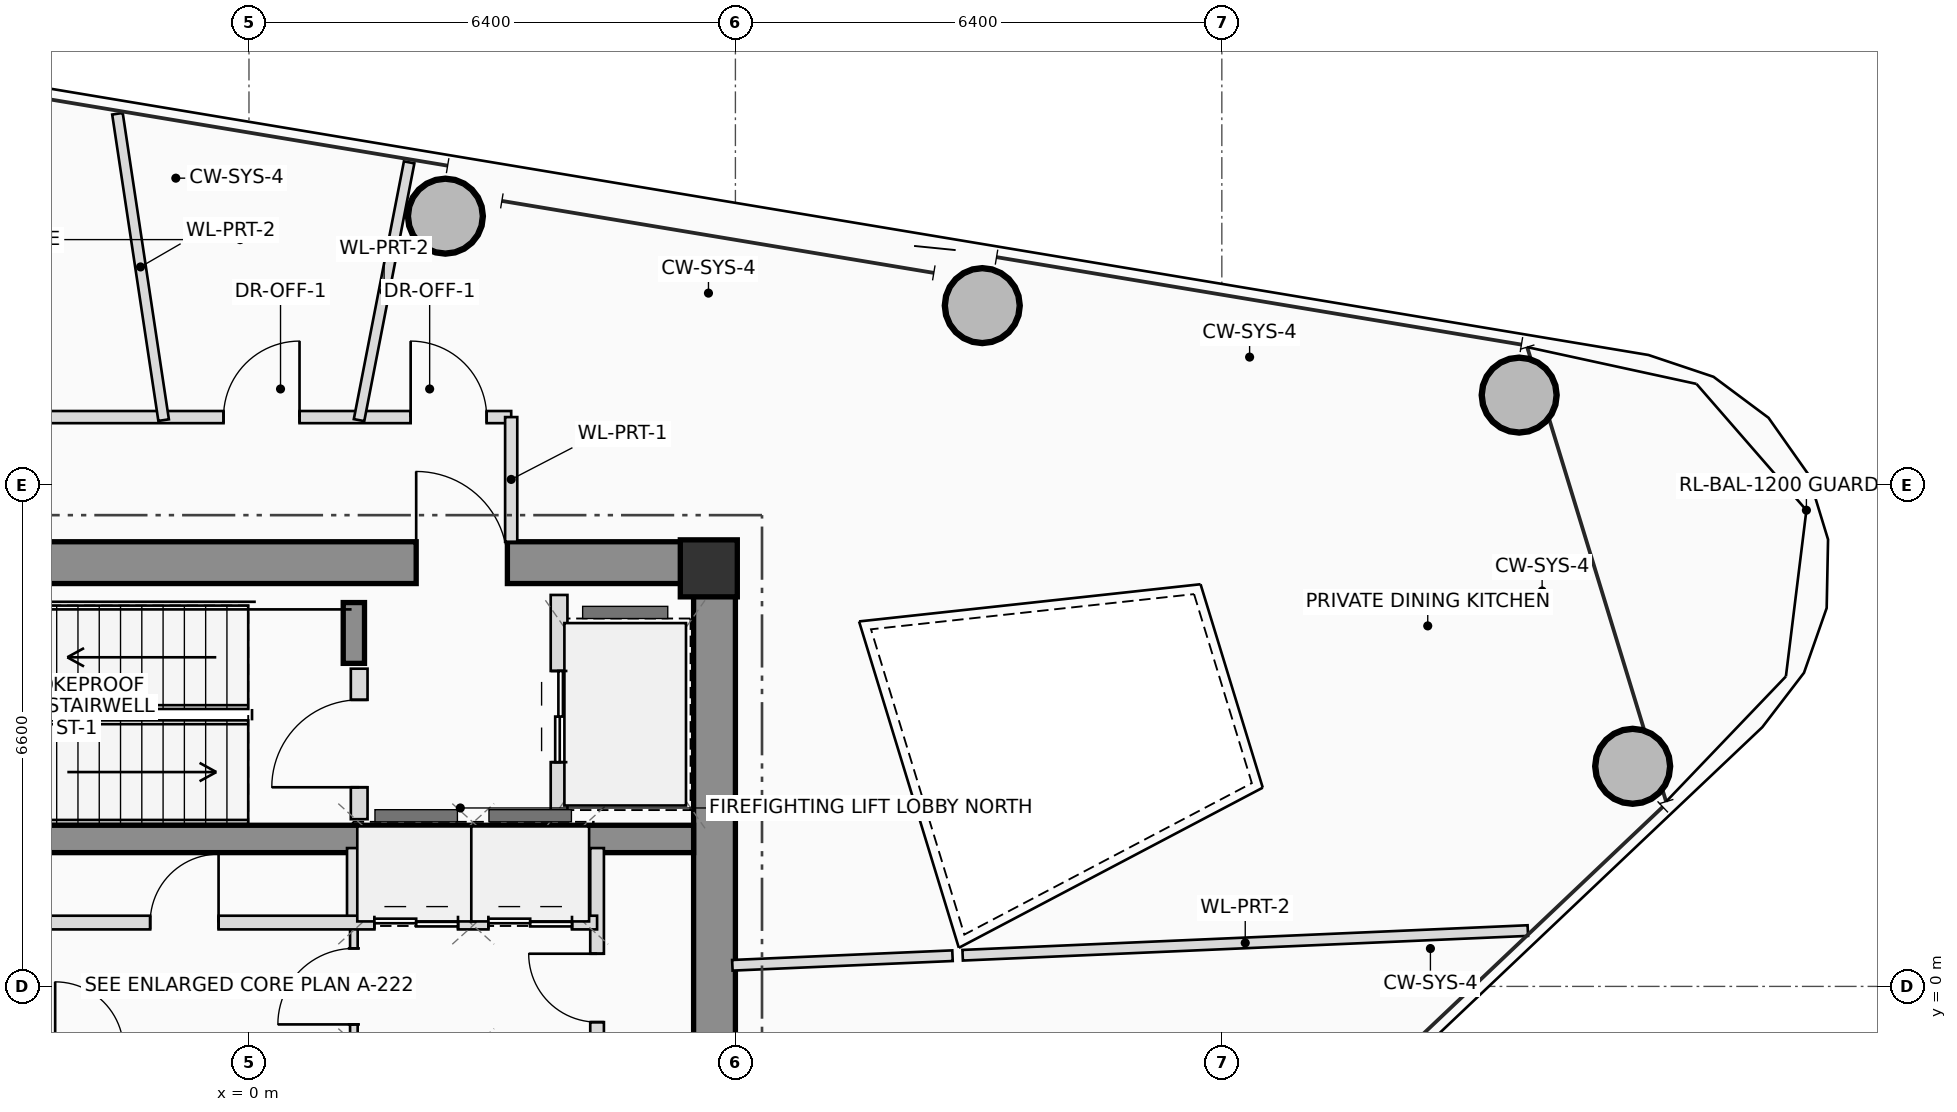
"""IFC4 building model, lengths in metres.
Left out: names, types, materials, properties, quantities, classifications, styles, units other than length and angle.
Written with IfcOpenShell. Run it as: python <this file> out.ifc"""

import sys

from ifc_helpers import new_model, si_unit, direction, frame, frame_2d, origin, origin_2d, place, context, subcontext, project, spatial, rectangle, hollow_circle, extrude, source, transform, mapped, element, fill, save


model = new_model("IFC4")
c1 = context("Model", 3, precision=1e-05, world=origin(), true_north=direction((0.0, 1.0)))
c2 = subcontext(c1, "Body", "Model", "MODEL_VIEW")
j1 = project(units=[si_unit("LENGTHUNIT", "METRE"), si_unit("PLANEANGLEUNIT", "RADIAN")], contexts=[c1])
p1 = place(None, origin())
s1 = spatial("IfcSite", under=j1, at=p1, CompositionType="ELEMENT")
p2 = place(p1, origin())
s2 = spatial("IfcBuilding", under=s1, at=p2, CompositionType="ELEMENT")
p3 = place(p2, frame((0.0, 0.0, 238.85)))
s3 = spatial("IfcBuildingStorey", under=s2, at=p3, CompositionType="ELEMENT", Elevation=238.85)
m1 = source(origin(), c2, "Body", "SweptSolid", [
    extrude(rectangle(XDim=0.75, YDim=0.75, at=origin_2d()), origin(), (0.0, 0.0, 1.0), 3.4),
])
p4 = place(p3, frame((6.05, 5.5, 0.0), z_axis=(0.0, 0.0, 1.0), x_axis=(1.0, 0.0, 0.0)))
e1 = element("IfcColumn", 1, at=p4, inside=s3, PredefinedType="COLUMN", context=c2, shape_type="MappedRepresentation", body=[
    mapped(m1, transform((0.0, 0.0, 0.0), scale=1.0)),
])
p5 = place(p3, frame((-6.4, 5.575, 0.0), z_axis=(0.0, 0.0, 1.0), x_axis=(1.0, 0.0, 0.0)))
e2 = element("IfcWall", 2, at=p5, inside=s3, PredefinedType="SHEAR", context=c2, shape_type="SweptSolid", body=[
    extrude(rectangle(XDim=12.8, YDim=0.55, at=frame_2d((6.4, 0.0))), origin(), (0.0, 0.0, 1.0), 3.4),
])
p6 = place(p5, frame((8.6, 0.0, 0.0)))
e3 = element("IfcOpeningElement", 3, at=p6, cuts=e2, PredefinedType="OPENING", context=c2, shape_type="SweptSolid", body=[
    extrude(rectangle(XDim=1.2, YDim=2.2, at=frame_2d((0.6, 1.1))), frame((0.0, 0.285, 0.0), z_axis=(0.0, -1.0, 0.0), x_axis=(1.0, 0.0, 0.0)), (0.0, 0.0, 1.0), 0.57),
])
p7 = place(p3, frame((6.125, -5.3, 0.0), z_axis=(0.0, 0.0, 1.0), x_axis=(0.0, 1.0, 0.0)))
e4 = element("IfcWall", 4, at=p7, inside=s3, PredefinedType="SHEAR", context=c2, shape_type="SweptSolid", body=[
    extrude(rectangle(XDim=10.6, YDim=0.55, at=frame_2d((5.3, 0.0))), origin(), (0.0, 0.0, 1.0), 3.4),
])
p8 = place(p3, frame((-5.85, 1.94, 0.0), z_axis=(0.0, 0.0, 1.0), x_axis=(1.0, 0.0, 0.0)))
e5 = element("IfcWall", 5, at=p8, inside=s3, PredefinedType="SHEAR", context=c2, shape_type="SweptSolid", body=[
    extrude(rectangle(XDim=11.7, YDim=0.36, at=frame_2d((5.85, 0.0))), origin(), (0.0, 0.0, 1.0), 3.4),
])
p9 = place(p3, frame((1.38, 4.25, 0.0), z_axis=(0.0, 0.0, 1.0), x_axis=(0.0, 1.0, 0.0)))
e6 = element("IfcWall", 6, at=p9, inside=s3, PredefinedType="SHEAR", context=c2, shape_type="SweptSolid", body=[
    extrude(rectangle(XDim=0.8, YDim=0.28, at=frame_2d((0.4, 0.0))), origin(), (0.0, 0.0, 1.0), 3.4),
])
m2 = source(origin(), c2, "Body", "SweptSolid", [
    extrude(hollow_circle(Radius=0.5, WallThickness=0.04, at=origin_2d()), origin(), (0.0, 0.0, 1.0), 3.4),
])
for number, where, z_axis, x_axis in (
    (7, (18.205, 2.896, 0.0), (0.0, 0.0, 1.0), (1.0, 0.0, 0.0)),
    (8, (16.712, 7.779, 0.0), (0.0, 0.0, 1.0), (1.0, 0.0, 0.0)),
    (9, (9.648, 8.957, 0.0), (0.0, 0.0, 1.0), (1.0, 0.0, 0.0)),
    (10, (2.584, 10.134, 0.0), (0.0, 0.0, 1.0), (1.0, 0.0, 0.0)),
):
    element("IfcColumn", number, at=place(p3, frame(where, z_axis=z_axis, x_axis=x_axis)), inside=s3, PredefinedType="COLUMN", context=c2, shape_type="MappedRepresentation", body=[
        mapped(m2, transform((0.0, 0.0, 0.0), scale=1.0)),
    ])
p10 = place(p3, frame((1.45, 2.2, 0.0), z_axis=(0.0, 0.0, 1.0), x_axis=(0.0, 1.0, 0.0)))
e11 = element("IfcWall", 11, at=p10, inside=s3, PredefinedType="PLUMBINGWALL", context=c2, shape_type="SweptSolid", body=[
    extrude(rectangle(XDim=1.98, YDim=0.22, at=frame_2d((0.99, 0.0))), origin(), (0.0, 0.0, 1.0), 3.2),
])
p11 = place(p10, frame((0.42, 0.0, 0.0)))
e12 = element("IfcOpeningElement", 12, at=p11, cuts=e11, PredefinedType="OPENING", context=c2, shape_type="SweptSolid", body=[
    extrude(rectangle(XDim=1.15, YDim=2.15, at=frame_2d((0.575, 1.075))), frame((0.0, 0.12, 0.0), z_axis=(0.0, -1.0, 0.0), x_axis=(1.0, 0.0, 0.0)), (0.0, 0.0, 1.0), 0.24),
])
p12 = place(p3, frame((4.08, 2.2, 0.0), z_axis=(0.0, 0.0, 1.0), x_axis=(0.0, 1.0, 0.0)))
e13 = element("IfcWall", 13, at=p12, inside=s3, PredefinedType="PLUMBINGWALL", context=c2, shape_type="SweptSolid", body=[
    extrude(rectangle(XDim=2.95, YDim=0.22, at=frame_2d((1.475, 0.0))), origin(), (0.0, 0.0, 1.0), 3.2),
])
p13 = place(p12, frame((0.75, 0.0, 0.0)))
e14 = element("IfcOpeningElement", 14, at=p13, cuts=e13, PredefinedType="OPENING", context=c2, shape_type="SweptSolid", body=[
    extrude(rectangle(XDim=1.2, YDim=2.25, at=frame_2d((0.6, 1.125))), frame((0.0, 0.12, 0.0), z_axis=(0.0, -1.0, 0.0), x_axis=(1.0, 0.0, 0.0)), (0.0, 0.0, 1.0), 0.24),
])
p14 = place(p3, frame((1.38, -0.84, 0.0), z_axis=(0.0, 0.0, 1.0), x_axis=(0.0, 1.0, 0.0)))
e15 = element("IfcWall", 15, at=p14, inside=s3, PredefinedType="PARTITIONING", context=c2, shape_type="SweptSolid", body=[
    extrude(rectangle(XDim=1.68, YDim=0.1, at=frame_2d((0.84, 0.0))), origin(), (0.0, 0.0, 1.0), 3.2),
])
p15 = place(p14, frame((0.34, 0.0, 0.0)))
e16 = element("IfcOpeningElement", 16, at=p15, cuts=e15, PredefinedType="OPENING", context=c2, shape_type="SweptSolid", body=[
    extrude(rectangle(XDim=1.0, YDim=2.25, at=frame_2d((0.5, 1.125))), frame((0.0, 0.06, 0.0), z_axis=(0.0, -1.0, 0.0), x_axis=(1.0, 0.0, 0.0)), (0.0, 0.0, 1.0), 0.12),
])
for number, where, z_axis, x_axis in (
    (17, (1.38, 0.84, 0.0), (0.0, 0.0, 1.0), (0.0, 1.0, 0.0)),
    (18, (3.02, 0.84, 0.0), (0.0, 0.0, 1.0), (0.0, 1.0, 0.0)),
    (19, (4.38, 0.84, 0.0), (0.0, 0.0, 1.0), (0.0, 1.0, 0.0)),
):
    element("IfcWall", number, at=place(p3, frame(where, z_axis=z_axis, x_axis=x_axis)), inside=s3, PredefinedType="PLUMBINGWALL", context=c2, shape_type="SweptSolid", body=[
        extrude(rectangle(XDim=0.98, YDim=0.18, at=frame_2d((0.49, 0.0))), origin(), (0.0, 0.0, 1.0), 3.2),
    ])
p16 = place(p3, frame((4.58, -1.82, 0.0), z_axis=(0.0, 0.0, 1.0), x_axis=(0.0, 1.0, 0.0)))
e20 = element("IfcWall", 20, at=p16, inside=s3, PredefinedType="PLUMBINGWALL", context=c2, shape_type="SweptSolid", body=[
    extrude(rectangle(XDim=3.64, YDim=0.18, at=frame_2d((1.82, 0.0))), origin(), (0.0, 0.0, 1.0), 3.2),
])
p17 = place(p16, frame((1.35, 0.0, 0.0)))
e21 = element("IfcOpeningElement", 21, at=p17, cuts=e20, PredefinedType="OPENING", context=c2, shape_type="SweptSolid", body=[
    extrude(rectangle(XDim=0.9, YDim=2.05, at=frame_2d((0.45, 1.025))), frame((0.0, 0.1, 0.0), z_axis=(0.0, -1.0, 0.0), x_axis=(1.0, 0.0, 0.0)), (0.0, 0.0, 1.0), 0.2),
])
p18 = place(p3, frame((-5.68, 0.84, 0.0), z_axis=(0.0, 0.0, 1.0), x_axis=(1.0, 0.0, 0.0)))
e22 = element("IfcWall", 22, at=p18, inside=s3, PredefinedType="PLUMBINGWALL", context=c2, shape_type="SweptSolid", body=[
    extrude(rectangle(XDim=10.26, YDim=0.18, at=frame_2d((5.13, 0.0))), origin(), (0.0, 0.0, 1.0), 3.2),
])
p19 = place(p18, frame((0.91, 0.0, 0.0)))
e23 = element("IfcOpeningElement", 23, at=p19, cuts=e22, PredefinedType="OPENING", context=c2, shape_type="SweptSolid", body=[
    extrude(rectangle(XDim=0.9, YDim=2.05, at=frame_2d((0.45, 1.025))), frame((0.0, 0.1, 0.0), z_axis=(0.0, -1.0, 0.0), x_axis=(1.0, 0.0, 0.0)), (0.0, 0.0, 1.0), 0.2),
])
p20 = place(p18, frame((4.38, 0.0, 0.0)))
e24 = element("IfcOpeningElement", 24, at=p20, cuts=e22, PredefinedType="OPENING", context=c2, shape_type="SweptSolid", body=[
    extrude(rectangle(XDim=0.9, YDim=2.05, at=frame_2d((0.45, 1.025))), frame((0.0, 0.1, 0.0), z_axis=(0.0, -1.0, 0.0), x_axis=(1.0, 0.0, 0.0)), (0.0, 0.0, 1.0), 0.2),
])
p21 = place(p18, frame((7.33, 0.0, 0.0)))
e25 = element("IfcOpeningElement", 25, at=p21, cuts=e22, PredefinedType="OPENING", context=c2, shape_type="SweptSolid", body=[
    extrude(rectangle(XDim=1.1, YDim=2.2, at=frame_2d((0.55, 1.1))), frame((0.0, 0.1, 0.0), z_axis=(0.0, -1.0, 0.0), x_axis=(1.0, 0.0, 0.0)), (0.0, 0.0, 1.0), 0.2),
])
p22 = place(p18, frame((8.83, 0.0, 0.0)))
e26 = element("IfcOpeningElement", 26, at=p22, cuts=e22, PredefinedType="OPENING", context=c2, shape_type="SweptSolid", body=[
    extrude(rectangle(XDim=1.1, YDim=2.2, at=frame_2d((0.55, 1.1))), frame((0.0, 0.1, 0.0), z_axis=(0.0, -1.0, 0.0), x_axis=(1.0, 0.0, 0.0)), (0.0, 0.0, 1.0), 0.2),
])
p23 = place(p3, frame((-6.36, 7.49, 0.0), z_axis=(0.0, 0.0, 1.0), x_axis=(1.0, 0.0, 0.0)))
e27 = element("IfcWall", 27, at=p23, inside=s3, PredefinedType="PARTITIONING", context=c2, shape_type="SweptSolid", body=[
    extrude(rectangle(XDim=9.81, YDim=0.16, at=frame_2d((4.905, 0.0))), origin(), (0.0, 0.0, 1.0), 2.605),
])
p24 = place(p23, frame((6.025, 0.0, 0.0)))
e28 = element("IfcOpeningElement", 28, at=p24, cuts=e27, PredefinedType="OPENING", context=c2, shape_type="SweptSolid", body=[
    extrude(rectangle(XDim=1.0, YDim=2.25, at=frame_2d((0.5, 1.125))), frame((0.0, 0.09, 0.0), z_axis=(0.0, -1.0, 0.0), x_axis=(1.0, 0.0, 0.0)), (0.0, 0.0, 1.0), 0.18),
])
p25 = place(p23, frame((8.487, 0.0, 0.0)))
e29 = element("IfcOpeningElement", 29, at=p25, cuts=e27, PredefinedType="OPENING", context=c2, shape_type="SweptSolid", body=[
    extrude(rectangle(XDim=1.0, YDim=2.25, at=frame_2d((0.5, 1.125))), frame((0.0, 0.09, 0.0), z_axis=(0.0, -1.0, 0.0), x_axis=(1.0, 0.0, 0.0)), (0.0, 0.0, 1.0), 0.18),
])
p26 = place(p3, frame((3.45, 7.49, 0.0), z_axis=(0.0, 0.0, 1.0), x_axis=(0.0, -1.0, 0.0)))
e30 = element("IfcWall", 30, at=p26, inside=s3, PredefinedType="PARTITIONING", context=c2, shape_type="SweptSolid", body=[
    extrude(rectangle(XDim=1.64, YDim=0.16, at=frame_2d((0.82, 0.0))), origin(), (0.0, 0.0, 1.0), 3.2),
])
p27 = place(p3, frame((6.36, 0.278, 0.0), z_axis=(0.0, 0.0, 1.0), x_axis=(0.999048037217, 0.043623609819, 0.0)))
e31 = element("IfcWall", 31, at=p27, inside=s3, PredefinedType="PARTITIONING", context=c2, shape_type="SweptSolid", body=[
    extrude(rectangle(XDim=2.899, YDim=0.14, at=frame_2d((1.449, 0.0))), origin(), (0.0, 0.0, 1.0), 3.2),
])
p28 = place(p3, frame((9.39, 0.41, 0.0), z_axis=(0.0, 0.0, 1.0), x_axis=(0.999047971421, 0.043625116619, 0.0)))
e32 = element("IfcWall", 32, at=p28, inside=s3, PredefinedType="PARTITIONING", context=c2, shape_type="SweptSolid", body=[
    extrude(rectangle(XDim=7.443, YDim=0.14, at=frame_2d((3.722, 0.0))), origin(), (0.0, 0.0, 1.0), 2.605),
])
p29 = place(p3, frame((1.448, 7.45, 0.0), z_axis=(0.0, 0.0, 1.0), x_axis=(0.19085452876, 0.981618331558, 0.0)))
e33 = element("IfcWall", 33, at=p29, inside=s3, PredefinedType="PARTITIONING", context=c2, shape_type="SweptSolid", body=[
    extrude(rectangle(XDim=3.455, YDim=0.14, at=frame_2d((1.728, 0.0))), origin(), (0.0, 0.0, 1.0), 2.765),
])
p30 = place(p3, frame((-1.123, 7.45, 0.0), z_axis=(0.0, 0.0, 1.0), x_axis=(-0.149063767164, 0.988827585234, 0.0)))
e34 = element("IfcWall", 34, at=p30, inside=s3, PredefinedType="PARTITIONING", context=c2, shape_type="SweptSolid", body=[
    extrude(rectangle(XDim=4.077, YDim=0.14, at=frame_2d((2.038, 0.0))), origin(), (0.0, 0.0, 1.0), 2.765),
])
p31 = place(p6, origin())
e35 = element("IfcDoor", 35, at=p31, inside=s3, OperationType="SINGLE_SWING_LEFT", PredefinedType="DOOR", context=c2, shape_type="SweptSolid", body=[
    extrude(rectangle(XDim=1.2, YDim=2.2, at=frame_2d((0.6, 1.1))), frame((0.0, 0.025, 0.0), z_axis=(0.0, -1.0, 0.0), x_axis=(1.0, 0.0, 0.0)), (0.0, 0.0, 1.0), 0.05),
])
fill(e3, e35)
p32 = place(p11, origin())
e36 = element("IfcDoor", 36, at=p32, inside=s3, OperationType="SINGLE_SWING_LEFT", PredefinedType="DOOR", context=c2, shape_type="SweptSolid", body=[
    extrude(rectangle(XDim=1.15, YDim=2.15, at=frame_2d((0.575, 1.075))), frame((0.0, 0.025, 0.0), z_axis=(0.0, -1.0, 0.0), x_axis=(1.0, 0.0, 0.0)), (0.0, 0.0, 1.0), 0.05),
])
fill(e12, e36)
p33 = place(p13, origin())
e37 = element("IfcDoor", 37, at=p33, inside=s3, OperationType="DOUBLE_DOOR_SLIDING", PredefinedType="DOOR", context=c2, shape_type="SweptSolid", body=[
    extrude(rectangle(XDim=1.2, YDim=2.25, at=frame_2d((0.6, 1.125))), frame((0.0, 0.025, 0.0), z_axis=(0.0, -1.0, 0.0), x_axis=(1.0, 0.0, 0.0)), (0.0, 0.0, 1.0), 0.05),
])
fill(e14, e37)
p34 = place(p15, origin())
e38 = element("IfcDoor", 38, at=p34, inside=s3, OperationType="SINGLE_SWING_LEFT", PredefinedType="DOOR", context=c2, shape_type="SweptSolid", body=[
    extrude(rectangle(XDim=1.0, YDim=2.25, at=frame_2d((0.5, 1.125))), frame((0.0, 0.025, 0.0), z_axis=(0.0, -1.0, 0.0), x_axis=(1.0, 0.0, 0.0)), (0.0, 0.0, 1.0), 0.05),
])
fill(e16, e38)
p35 = place(p17, origin())
e39 = element("IfcDoor", 39, at=p35, inside=s3, OperationType="SINGLE_SWING_RIGHT", PredefinedType="DOOR", context=c2, shape_type="SweptSolid", body=[
    extrude(rectangle(XDim=0.9, YDim=2.05, at=frame_2d((0.45, 1.025))), frame((0.0, 0.025, 0.0), z_axis=(0.0, -1.0, 0.0), x_axis=(1.0, 0.0, 0.0)), (0.0, 0.0, 1.0), 0.05),
])
fill(e21, e39)
p36 = place(p20, origin())
e40 = element("IfcDoor", 40, at=p36, inside=s3, OperationType="SINGLE_SWING_RIGHT", PredefinedType="DOOR", context=c2, shape_type="SweptSolid", body=[
    extrude(rectangle(XDim=0.9, YDim=2.05, at=frame_2d((0.45, 1.025))), frame((0.0, 0.025, 0.0), z_axis=(0.0, -1.0, 0.0), x_axis=(1.0, 0.0, 0.0)), (0.0, 0.0, 1.0), 0.05),
])
fill(e24, e40)
p37 = place(p21, origin())
e41 = element("IfcDoor", 41, at=p37, inside=s3, OperationType="DOUBLE_DOOR_SLIDING", PredefinedType="DOOR", context=c2, shape_type="SweptSolid", body=[
    extrude(rectangle(XDim=1.1, YDim=2.2, at=frame_2d((0.55, 1.1))), frame((0.0, 0.025, 0.0), z_axis=(0.0, -1.0, 0.0), x_axis=(1.0, 0.0, 0.0)), (0.0, 0.0, 1.0), 0.05),
])
fill(e25, e41)
p38 = place(p22, origin())
e42 = element("IfcDoor", 42, at=p38, inside=s3, OperationType="DOUBLE_DOOR_SLIDING", PredefinedType="DOOR", context=c2, shape_type="SweptSolid", body=[
    extrude(rectangle(XDim=1.1, YDim=2.2, at=frame_2d((0.55, 1.1))), frame((0.0, 0.025, 0.0), z_axis=(0.0, -1.0, 0.0), x_axis=(1.0, 0.0, 0.0)), (0.0, 0.0, 1.0), 0.05),
])
fill(e26, e42)
p39 = place(p24, origin())
e43 = element("IfcDoor", 43, at=p39, inside=s3, OperationType="SINGLE_SWING_RIGHT", PredefinedType="DOOR", context=c2, shape_type="SweptSolid", body=[
    extrude(rectangle(XDim=1.0, YDim=2.25, at=frame_2d((0.5, 1.125))), frame((0.0, 0.025, 0.0), z_axis=(0.0, -1.0, 0.0), x_axis=(1.0, 0.0, 0.0)), (0.0, 0.0, 1.0), 0.05),
])
fill(e28, e43)
p40 = place(p25, origin())
e44 = element("IfcDoor", 44, at=p40, inside=s3, OperationType="SINGLE_SWING_LEFT", PredefinedType="DOOR", context=c2, shape_type="SweptSolid", body=[
    extrude(rectangle(XDim=1.0, YDim=2.25, at=frame_2d((0.5, 1.125))), frame((0.0, 0.025, 0.0), z_axis=(0.0, -1.0, 0.0), x_axis=(1.0, 0.0, 0.0)), (0.0, 0.0, 1.0), 0.05),
])
fill(e29, e44)
save(model, sys.argv[1])
